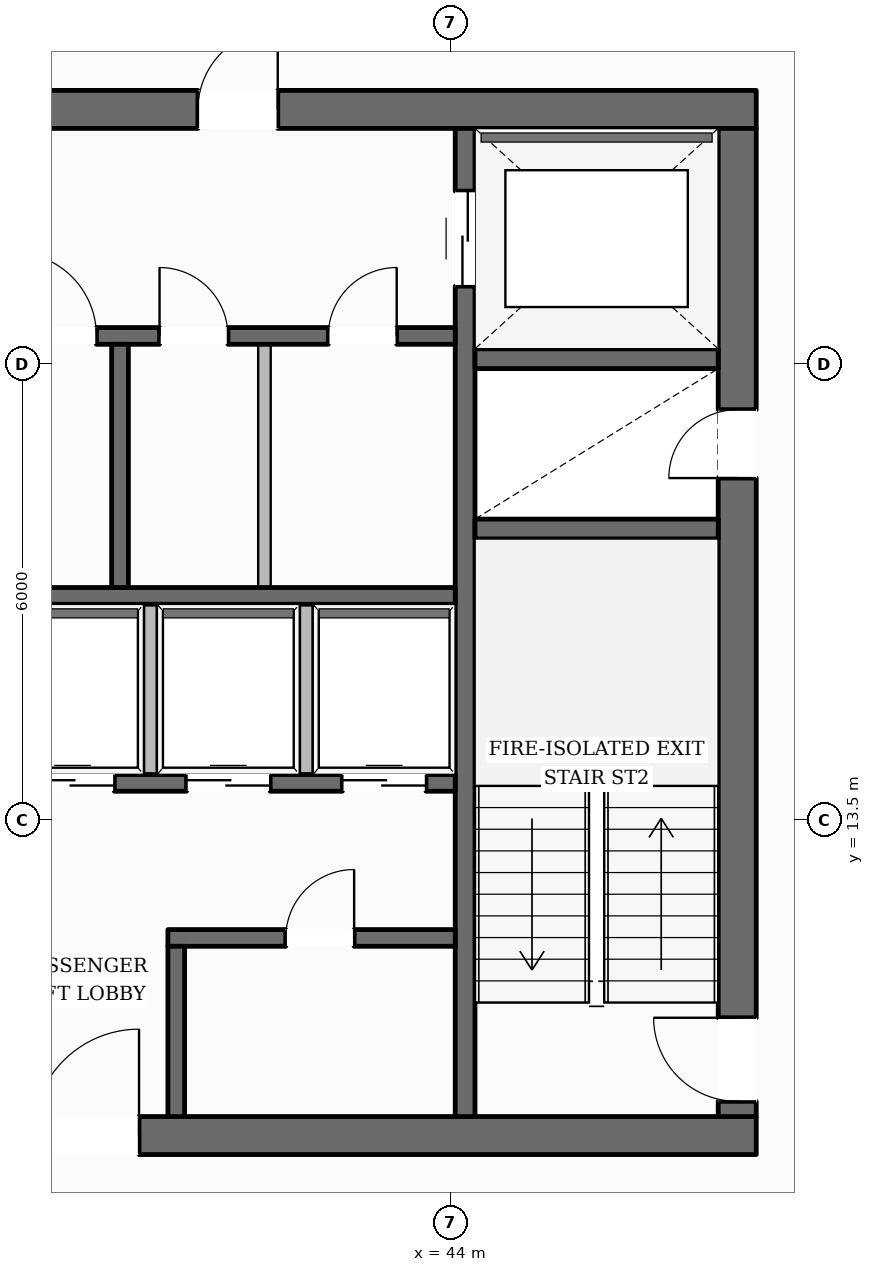
"""IFC4 building model, lengths in metres.
Left out: names, types, materials, properties, quantities, classifications, styles, units other than length and angle.
Written with IfcOpenShell. Run it as: python <this file> out.ifc"""

import sys

from ifc_helpers import new_model, si_unit, direction, frame, frame_2d, origin, place, context, subcontext, project, spatial, rectangle, extrude, element, fill, save


model = new_model("IFC4")
c1 = context("Model", 3, precision=1e-05, world=origin(), true_north=direction((0.0, 1.0)))
c2 = subcontext(c1, "Body", "Model", "MODEL_VIEW")
j1 = project(units=[si_unit("LENGTHUNIT", "METRE"), si_unit("PLANEANGLEUNIT", "RADIAN")], contexts=[c1])
p1 = place(None, origin())
s1 = spatial("IfcSite", under=j1, at=p1, CompositionType="ELEMENT")
p2 = place(p1, origin())
s2 = spatial("IfcBuilding", under=s1, at=p2, CompositionType="ELEMENT")
p3 = place(p2, frame((0.0, 0.0, 139.4)))
s3 = spatial("IfcBuildingStorey", under=s2, at=p3, CompositionType="ELEMENT", Elevation=139.4)
p4 = place(p3, frame((27.98, 9.35, 0.0), z_axis=(0.0, 0.0, 1.0), x_axis=(1.0, 0.0, 0.0)))
e1 = element("IfcWall", 1, at=p4, inside=s3, PredefinedType="SOLIDWALL", context=c2, shape_type="SweptSolid", body=[
    extrude(rectangle(XDim=20.04, YDim=0.5, at=frame_2d((10.02, 0.0))), origin(), (0.0, 0.0, 1.0), 3.6),
])
p5 = place(p4, frame((10.52, 0.0, 0.0)))
e2 = element("IfcOpeningElement", 2, at=p5, cuts=e1, PredefinedType="OPENING", context=c2, shape_type="SweptSolid", body=[
    extrude(rectangle(XDim=1.4, YDim=2.2, at=frame_2d((0.7, 1.1))), frame((0.0, 0.26, 0.0), z_axis=(0.0, -1.0, 0.0), x_axis=(1.0, 0.0, 0.0)), (0.0, 0.0, 1.0), 0.52),
])
p6 = place(p3, frame((27.98, 22.85, 0.0), z_axis=(0.0, 0.0, 1.0), x_axis=(1.0, 0.0, 0.0)))
e3 = element("IfcWall", 3, at=p6, inside=s3, PredefinedType="SOLIDWALL", context=c2, shape_type="SweptSolid", body=[
    extrude(rectangle(XDim=20.04, YDim=0.5, at=frame_2d((10.02, 0.0))), origin(), (0.0, 0.0, 1.0), 3.6),
])
p7 = place(p6, frame((6.295, 0.0, 0.0)))
e4 = element("IfcOpeningElement", 4, at=p7, cuts=e3, PredefinedType="OPENING", context=c2, shape_type="SweptSolid", body=[
    extrude(rectangle(XDim=1.05, YDim=2.15, at=frame_2d((0.525, 1.075))), frame((0.0, 0.26, 0.0), z_axis=(0.0, -1.0, 0.0), x_axis=(1.0, 0.0, 0.0)), (0.0, 0.0, 1.0), 0.52),
])
p8 = place(p6, frame((12.695, 0.0, 0.0)))
e5 = element("IfcOpeningElement", 5, at=p8, cuts=e3, PredefinedType="OPENING", context=c2, shape_type="SweptSolid", body=[
    extrude(rectangle(XDim=1.05, YDim=2.15, at=frame_2d((0.525, 1.075))), frame((0.0, 0.26, 0.0), z_axis=(0.0, -1.0, 0.0), x_axis=(1.0, 0.0, 0.0)), (0.0, 0.0, 1.0), 0.52),
])
p9 = place(p3, frame((47.77, 9.6, 0.0), z_axis=(0.0, 0.0, 1.0), x_axis=(0.0, 1.0, 0.0)))
e6 = element("IfcWall", 6, at=p9, inside=s3, PredefinedType="SOLIDWALL", context=c2, shape_type="SweptSolid", body=[
    extrude(rectangle(XDim=13.0, YDim=0.5, at=frame_2d((6.5, 0.0))), origin(), (0.0, 0.0, 1.0), 3.6),
])
p10 = place(p9, frame((0.2, 0.0, 0.0)))
e7 = element("IfcOpeningElement", 7, at=p10, cuts=e6, PredefinedType="OPENING", context=c2, shape_type="SweptSolid", body=[
    extrude(rectangle(XDim=1.1, YDim=2.15, at=frame_2d((0.55, 1.075))), frame((0.0, 0.26, 0.0), z_axis=(0.0, -1.0, 0.0), x_axis=(1.0, 0.0, 0.0)), (0.0, 0.0, 1.0), 0.52),
])
p11 = place(p9, frame((8.4, 0.0, 0.0)))
e8 = element("IfcOpeningElement", 8, at=p11, cuts=e6, PredefinedType="OPENING", context=c2, shape_type="SweptSolid", body=[
    extrude(rectangle(XDim=0.9, YDim=2.1, at=frame_2d((0.45, 1.05))), frame((0.0, 0.26, 0.0), z_axis=(0.0, -1.0, 0.0), x_axis=(1.0, 0.0, 0.0)), (0.0, 0.0, 1.0), 0.52),
])
p12 = place(p3, frame((44.19, 9.6, 0.0), z_axis=(0.0, 0.0, 1.0), x_axis=(0.0, 1.0, 0.0)))
e9 = element("IfcWall", 9, at=p12, inside=s3, PredefinedType="SHEAR", context=c2, shape_type="SweptSolid", body=[
    extrude(rectangle(XDim=13.0, YDim=0.26, at=frame_2d((6.5, 0.0))), origin(), (0.0, 0.0, 1.0), 3.6),
])
p13 = place(p12, frame((10.925, 0.0, 0.0)))
e10 = element("IfcOpeningElement", 10, at=p13, cuts=e9, PredefinedType="OPENING", context=c2, shape_type="SweptSolid", body=[
    extrude(rectangle(XDim=1.25, YDim=2.25, at=frame_2d((0.625, 1.125))), frame((0.0, 0.14, 0.0), z_axis=(0.0, -1.0, 0.0), x_axis=(1.0, 0.0, 0.0)), (0.0, 0.0, 1.0), 0.28),
])
for number, where, z_axis, x_axis in (
    (11, (44.32, 17.33, 0.0), (0.0, 0.0, 1.0), (1.0, 0.0, 0.0)),
    (12, (44.32, 19.57, 0.0), (0.0, 0.0, 1.0), (1.0, 0.0, 0.0)),
):
    element("IfcWall", number, at=place(p3, frame(where, z_axis=z_axis, x_axis=x_axis)), inside=s3, PredefinedType="SHEAR", context=c2, shape_type="SweptSolid", body=[
        extrude(rectangle(XDim=3.2, YDim=0.26, at=frame_2d((1.6, 0.0))), origin(), (0.0, 0.0, 1.0), 3.6),
    ])
p14 = place(p3, frame((31.94, 19.87, 0.0), z_axis=(0.0, 0.0, 1.0), x_axis=(1.0, 0.0, 0.0)))
e13 = element("IfcWall", 13, at=p14, inside=s3, PredefinedType="SOLIDWALL", context=c2, shape_type="SweptSolid", body=[
    extrude(rectangle(XDim=12.12, YDim=0.22, at=frame_2d((6.06, 0.0))), origin(), (0.0, 0.0, 1.0), 3.6),
])
p15 = place(p14, frame((6.3, 0.0, 0.0)))
e14 = element("IfcOpeningElement", 14, at=p15, cuts=e13, PredefinedType="OPENING", context=c2, shape_type="SweptSolid", body=[
    extrude(rectangle(XDim=1.1, YDim=2.15, at=frame_2d((0.55, 1.075))), frame((0.0, 0.12, 0.0), z_axis=(0.0, -1.0, 0.0), x_axis=(1.0, 0.0, 0.0)), (0.0, 0.0, 1.0), 0.24),
])
p16 = place(p14, frame((8.23, 0.0, 0.0)))
e15 = element("IfcOpeningElement", 15, at=p16, cuts=e13, PredefinedType="OPENING", context=c2, shape_type="SweptSolid", body=[
    extrude(rectangle(XDim=0.9, YDim=2.1, at=frame_2d((0.45, 1.05))), frame((0.0, 0.12, 0.0), z_axis=(0.0, -1.0, 0.0), x_axis=(1.0, 0.0, 0.0)), (0.0, 0.0, 1.0), 0.24),
])
p17 = place(p14, frame((10.45, 0.0, 0.0)))
e16 = element("IfcOpeningElement", 16, at=p17, cuts=e13, PredefinedType="OPENING", context=c2, shape_type="SweptSolid", body=[
    extrude(rectangle(XDim=0.9, YDim=2.1, at=frame_2d((0.45, 1.05))), frame((0.0, 0.12, 0.0), z_axis=(0.0, -1.0, 0.0), x_axis=(1.0, 0.0, 0.0)), (0.0, 0.0, 1.0), 0.24),
])
p18 = place(p3, frame((31.94, 16.45, 0.0), z_axis=(0.0, 0.0, 1.0), x_axis=(1.0, 0.0, 0.0)))
e17 = element("IfcWall", 17, at=p18, inside=s3, PredefinedType="SOLIDWALL", context=c2, shape_type="SweptSolid", body=[
    extrude(rectangle(XDim=12.12, YDim=0.22, at=frame_2d((6.06, 0.0))), origin(), (0.0, 0.0, 1.0), 3.6),
])
p19 = place(p3, frame((39.65, 16.56, 0.0), z_axis=(0.0, 0.0, 1.0), x_axis=(0.0, 1.0, 0.0)))
e18 = element("IfcWall", 18, at=p19, inside=s3, PredefinedType="SOLIDWALL", context=c2, shape_type="SweptSolid", body=[
    extrude(rectangle(XDim=3.2, YDim=0.22, at=frame_2d((1.6, 0.0))), origin(), (0.0, 0.0, 1.0), 3.6),
])
p20 = place(p3, frame((31.94, 13.99, 0.0), z_axis=(0.0, 0.0, 1.0), x_axis=(1.0, 0.0, 0.0)))
e19 = element("IfcWall", 19, at=p20, inside=s3, PredefinedType="SOLIDWALL", context=c2, shape_type="SweptSolid", body=[
    extrude(rectangle(XDim=12.12, YDim=0.22, at=frame_2d((6.06, 0.0))), origin(), (0.0, 0.0, 1.0), 3.6),
])
p21 = place(p20, frame((1.21, 0.0, 0.0)))
e20 = element("IfcOpeningElement", 20, at=p21, cuts=e19, PredefinedType="OPENING", context=c2, shape_type="SweptSolid", body=[
    extrude(rectangle(XDim=0.9, YDim=2.1, at=frame_2d((0.45, 1.05))), frame((0.0, 0.12, 0.0), z_axis=(0.0, -1.0, 0.0), x_axis=(1.0, 0.0, 0.0)), (0.0, 0.0, 1.0), 0.24),
])
p22 = place(p20, frame((4.31, 0.0, 0.0)))
e21 = element("IfcOpeningElement", 21, at=p22, cuts=e19, PredefinedType="OPENING", context=c2, shape_type="SweptSolid", body=[
    extrude(rectangle(XDim=0.9, YDim=2.1, at=frame_2d((0.45, 1.05))), frame((0.0, 0.12, 0.0), z_axis=(0.0, -1.0, 0.0), x_axis=(1.0, 0.0, 0.0)), (0.0, 0.0, 1.0), 0.24),
])
p23 = place(p20, frame((6.535, 0.0, 0.0)))
e22 = element("IfcOpeningElement", 22, at=p23, cuts=e19, PredefinedType="OPENING", context=c2, shape_type="SweptSolid", body=[
    extrude(rectangle(XDim=1.1, YDim=2.2, at=frame_2d((0.55, 1.1))), frame((0.0, 0.12, 0.0), z_axis=(0.0, -1.0, 0.0), x_axis=(1.0, 0.0, 0.0)), (0.0, 0.0, 1.0), 0.24),
])
p24 = place(p20, frame((8.585, 0.0, 0.0)))
e23 = element("IfcOpeningElement", 23, at=p24, cuts=e19, PredefinedType="OPENING", context=c2, shape_type="SweptSolid", body=[
    extrude(rectangle(XDim=1.1, YDim=2.2, at=frame_2d((0.55, 1.1))), frame((0.0, 0.12, 0.0), z_axis=(0.0, -1.0, 0.0), x_axis=(1.0, 0.0, 0.0)), (0.0, 0.0, 1.0), 0.24),
])
p25 = place(p20, frame((10.635, 0.0, 0.0)))
e24 = element("IfcOpeningElement", 24, at=p25, cuts=e19, PredefinedType="OPENING", context=c2, shape_type="SweptSolid", body=[
    extrude(rectangle(XDim=1.1, YDim=2.2, at=frame_2d((0.55, 1.1))), frame((0.0, 0.12, 0.0), z_axis=(0.0, -1.0, 0.0), x_axis=(1.0, 0.0, 0.0)), (0.0, 0.0, 1.0), 0.24),
])
p26 = place(p3, frame((40.28, 11.95, 0.0), z_axis=(0.0, 0.0, 1.0), x_axis=(1.0, 0.0, 0.0)))
e25 = element("IfcWall", 25, at=p26, inside=s3, PredefinedType="SOLIDWALL", context=c2, shape_type="SweptSolid", body=[
    extrude(rectangle(XDim=3.78, YDim=0.22, at=frame_2d((1.89, 0.0))), origin(), (0.0, 0.0, 1.0), 3.6),
])
p27 = place(p26, frame((1.55, 0.0, 0.0)))
e26 = element("IfcOpeningElement", 26, at=p27, cuts=e25, PredefinedType="OPENING", context=c2, shape_type="SweptSolid", body=[
    extrude(rectangle(XDim=0.9, YDim=2.1, at=frame_2d((0.45, 1.05))), frame((0.0, 0.12, 0.0), z_axis=(0.0, -1.0, 0.0), x_axis=(1.0, 0.0, 0.0)), (0.0, 0.0, 1.0), 0.24),
])
p28 = place(p3, frame((40.39, 9.6, 0.0), z_axis=(0.0, 0.0, 1.0), x_axis=(0.0, 1.0, 0.0)))
e27 = element("IfcWall", 27, at=p28, inside=s3, PredefinedType="SOLIDWALL", context=c2, shape_type="SweptSolid", body=[
    extrude(rectangle(XDim=2.24, YDim=0.22, at=frame_2d((1.12, 0.0))), origin(), (0.0, 0.0, 1.0), 3.6),
])
p29 = place(p3, frame((43.468, 44.663, 0.0), z_axis=(0.0, 0.0, 1.0), x_axis=(0.501788207044, -0.864990517446, 0.0)))
e28 = element("IfcWall", 28, at=p29, inside=s3, PredefinedType="STANDARD", context=c2, shape_type="SweptSolid", body=[
    extrude(rectangle(XDim=37.465, YDim=0.38, at=frame_2d((18.732, 0.0))), origin(), (0.0, 0.0, 1.0), 3.059),
])
p30 = place(p29, frame((33.167, 0.0, 0.65)))
e29 = element("IfcOpeningElement", 29, at=p30, cuts=e28, PredefinedType="OPENING", context=c2, shape_type="SweptSolid", body=[
    extrude(rectangle(XDim=1.55, YDim=1.75, at=frame_2d((0.775, 0.875))), frame((0.0, 0.2, 0.0), z_axis=(0.0, -1.0, 0.0), x_axis=(1.0, 0.0, 0.0)), (0.0, 0.0, 1.0), 0.4),
])
p31 = place(p29, frame((27.083, 0.0, 0.65)))
e30 = element("IfcOpeningElement", 30, at=p31, cuts=e28, PredefinedType="OPENING", context=c2, shape_type="SweptSolid", body=[
    extrude(rectangle(XDim=1.55, YDim=1.75, at=frame_2d((0.775, 0.875))), frame((0.0, 0.2, 0.0), z_axis=(0.0, -1.0, 0.0), x_axis=(1.0, 0.0, 0.0)), (0.0, 0.0, 1.0), 0.4),
])
p32 = place(p29, frame((14.914, 0.0, 0.65)))
e31 = element("IfcOpeningElement", 31, at=p32, cuts=e28, PredefinedType="OPENING", context=c2, shape_type="SweptSolid", body=[
    extrude(rectangle(XDim=1.55, YDim=1.75, at=frame_2d((0.775, 0.875))), frame((0.0, 0.2, 0.0), z_axis=(0.0, -1.0, 0.0), x_axis=(1.0, 0.0, 0.0)), (0.0, 0.0, 1.0), 0.4),
])
p33 = place(p29, frame((8.83, 0.0, 0.65)))
e32 = element("IfcOpeningElement", 32, at=p33, cuts=e28, PredefinedType="OPENING", context=c2, shape_type="SweptSolid", body=[
    extrude(rectangle(XDim=1.55, YDim=1.75, at=frame_2d((0.775, 0.875))), frame((0.0, 0.2, 0.0), z_axis=(0.0, -1.0, 0.0), x_axis=(1.0, 0.0, 0.0)), (0.0, 0.0, 1.0), 0.4),
])
p34 = place(p29, frame((2.745, 0.0, 0.65)))
e33 = element("IfcOpeningElement", 33, at=p34, cuts=e28, PredefinedType="OPENING", context=c2, shape_type="SweptSolid", body=[
    extrude(rectangle(XDim=1.55, YDim=1.75, at=frame_2d((0.775, 0.875))), frame((0.0, 0.2, 0.0), z_axis=(0.0, -1.0, 0.0), x_axis=(1.0, 0.0, 0.0)), (0.0, 0.0, 1.0), 0.4),
])
for number, where, z_axis, x_axis in (
    (34, (40.05, 14.1, 0.0), (0.0, 0.0, 1.0), (0.0, 1.0, 0.0)),
    (35, (42.1, 14.1, 0.0), (0.0, 0.0, 1.0), (0.0, 1.0, 0.0)),
):
    element("IfcWall", number, at=place(p3, frame(where, z_axis=z_axis, x_axis=x_axis)), inside=s3, PredefinedType="PARTITIONING", context=c2, shape_type="SweptSolid", body=[
        extrude(rectangle(XDim=2.24, YDim=0.165, at=frame_2d((1.12, 0.0))), origin(), (0.0, 0.0, 1.0), 3.6),
    ])
p35 = place(p3, frame((41.55, 16.56, 0.0), z_axis=(0.0, 0.0, 1.0), x_axis=(0.0, 1.0, 0.0)))
e36 = element("IfcWall", 36, at=p35, inside=s3, PredefinedType="PARTITIONING", context=c2, shape_type="SweptSolid", body=[
    extrude(rectangle(XDim=3.2, YDim=0.165, at=frame_2d((1.6, 0.0))), origin(), (0.0, 0.0, 1.0), 3.6),
])
p36 = place(p10, origin())
e37 = element("IfcDoor", 37, at=p36, inside=s3, OperationType="SINGLE_SWING_RIGHT", PredefinedType="DOOR", context=c2, shape_type="SweptSolid", body=[
    extrude(rectangle(XDim=1.1, YDim=2.15, at=frame_2d((0.55, 1.075))), frame((0.0, 0.025, 0.0), z_axis=(0.0, -1.0, 0.0), x_axis=(1.0, 0.0, 0.0)), (0.0, 0.0, 1.0), 0.05),
])
fill(e7, e37)
p37 = place(p15, origin())
e38 = element("IfcDoor", 38, at=p37, inside=s3, OperationType="SINGLE_SWING_LEFT", PredefinedType="DOOR", context=c2, shape_type="SweptSolid", body=[
    extrude(rectangle(XDim=1.1, YDim=2.15, at=frame_2d((0.55, 1.075))), frame((0.0, 0.025, 0.0), z_axis=(0.0, -1.0, 0.0), x_axis=(1.0, 0.0, 0.0)), (0.0, 0.0, 1.0), 0.05),
])
fill(e14, e38)
p38 = place(p11, origin())
e39 = element("IfcDoor", 39, at=p38, inside=s3, OperationType="SINGLE_SWING_LEFT", PredefinedType="DOOR", context=c2, shape_type="SweptSolid", body=[
    extrude(rectangle(XDim=0.9, YDim=2.1, at=frame_2d((0.45, 1.05))), frame((0.0, 0.025, 0.0), z_axis=(0.0, -1.0, 0.0), x_axis=(1.0, 0.0, 0.0)), (0.0, 0.0, 1.0), 0.05),
])
fill(e8, e39)
p39 = place(p8, origin())
e40 = element("IfcDoor", 40, at=p39, inside=s3, OperationType="SINGLE_SWING_RIGHT", PredefinedType="DOOR", context=c2, shape_type="SweptSolid", body=[
    extrude(rectangle(XDim=1.05, YDim=2.15, at=frame_2d((0.525, 1.075))), frame((0.0, 0.025, 0.0), z_axis=(0.0, -1.0, 0.0), x_axis=(1.0, 0.0, 0.0)), (0.0, 0.0, 1.0), 0.05),
])
fill(e5, e40)
p40 = place(p13, origin())
e41 = element("IfcDoor", 41, at=p40, inside=s3, OperationType="DOUBLE_DOOR_SLIDING", PredefinedType="DOOR", context=c2, shape_type="SweptSolid", body=[
    extrude(rectangle(XDim=1.25, YDim=2.25, at=frame_2d((0.625, 1.125))), frame((0.0, 0.025, 0.0), z_axis=(0.0, -1.0, 0.0), x_axis=(1.0, 0.0, 0.0)), (0.0, 0.0, 1.0), 0.05),
])
fill(e10, e41)
p41 = place(p5, origin())
e42 = element("IfcDoor", 42, at=p41, inside=s3, OperationType="SINGLE_SWING_RIGHT", PredefinedType="DOOR", context=c2, shape_type="SweptSolid", body=[
    extrude(rectangle(XDim=1.4, YDim=2.2, at=frame_2d((0.7, 1.1))), frame((0.0, 0.025, 0.0), z_axis=(0.0, -1.0, 0.0), x_axis=(1.0, 0.0, 0.0)), (0.0, 0.0, 1.0), 0.05),
])
fill(e2, e42)
p42 = place(p23, origin())
e43 = element("IfcDoor", 43, at=p42, inside=s3, OperationType="DOUBLE_DOOR_SLIDING", PredefinedType="DOOR", context=c2, shape_type="SweptSolid", body=[
    extrude(rectangle(XDim=1.1, YDim=2.2, at=frame_2d((0.55, 1.1))), frame((0.0, 0.025, 0.0), z_axis=(0.0, -1.0, 0.0), x_axis=(1.0, 0.0, 0.0)), (0.0, 0.0, 1.0), 0.05),
])
fill(e22, e43)
p43 = place(p24, origin())
e44 = element("IfcDoor", 44, at=p43, inside=s3, OperationType="DOUBLE_DOOR_SLIDING", PredefinedType="DOOR", context=c2, shape_type="SweptSolid", body=[
    extrude(rectangle(XDim=1.1, YDim=2.2, at=frame_2d((0.55, 1.1))), frame((0.0, 0.025, 0.0), z_axis=(0.0, -1.0, 0.0), x_axis=(1.0, 0.0, 0.0)), (0.0, 0.0, 1.0), 0.05),
])
fill(e23, e44)
p44 = place(p25, origin())
e45 = element("IfcDoor", 45, at=p44, inside=s3, OperationType="DOUBLE_DOOR_SLIDING", PredefinedType="DOOR", context=c2, shape_type="SweptSolid", body=[
    extrude(rectangle(XDim=1.1, YDim=2.2, at=frame_2d((0.55, 1.1))), frame((0.0, 0.025, 0.0), z_axis=(0.0, -1.0, 0.0), x_axis=(1.0, 0.0, 0.0)), (0.0, 0.0, 1.0), 0.05),
])
fill(e24, e45)
p45 = place(p16, origin())
e46 = element("IfcDoor", 46, at=p45, inside=s3, OperationType="SINGLE_SWING_LEFT", PredefinedType="DOOR", context=c2, shape_type="SweptSolid", body=[
    extrude(rectangle(XDim=0.9, YDim=2.1, at=frame_2d((0.45, 1.05))), frame((0.0, 0.025, 0.0), z_axis=(0.0, -1.0, 0.0), x_axis=(1.0, 0.0, 0.0)), (0.0, 0.0, 1.0), 0.05),
])
fill(e15, e46)
p46 = place(p17, origin())
e47 = element("IfcDoor", 47, at=p46, inside=s3, OperationType="SINGLE_SWING_RIGHT", PredefinedType="DOOR", context=c2, shape_type="SweptSolid", body=[
    extrude(rectangle(XDim=0.9, YDim=2.1, at=frame_2d((0.45, 1.05))), frame((0.0, 0.025, 0.0), z_axis=(0.0, -1.0, 0.0), x_axis=(1.0, 0.0, 0.0)), (0.0, 0.0, 1.0), 0.05),
])
fill(e16, e47)
p47 = place(p27, origin())
e48 = element("IfcDoor", 48, at=p47, inside=s3, OperationType="SINGLE_SWING_RIGHT", PredefinedType="DOOR", context=c2, shape_type="SweptSolid", body=[
    extrude(rectangle(XDim=0.9, YDim=2.1, at=frame_2d((0.45, 1.05))), frame((0.0, 0.025, 0.0), z_axis=(0.0, -1.0, 0.0), x_axis=(1.0, 0.0, 0.0)), (0.0, 0.0, 1.0), 0.05),
])
fill(e26, e48)
save(model, sys.argv[1])
